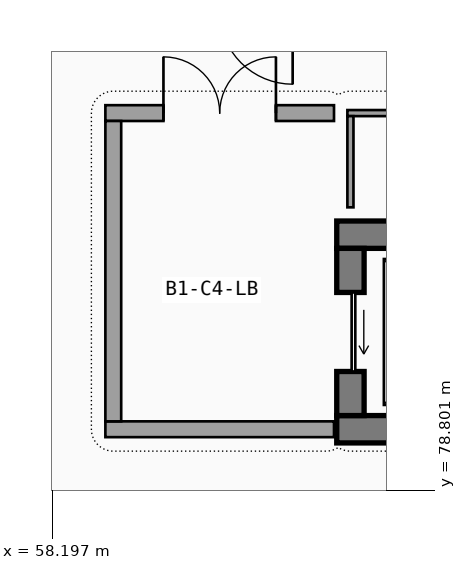
"""IFC4 building model, lengths in metres.
Left out: names, types, materials, properties, quantities, classifications, styles, units other than length and angle.
Written with IfcOpenShell. Run it as: python <this file> out.ifc"""

import sys

from ifc_helpers import new_model, si_unit, direction, frame, frame_2d, origin, place, context, subcontext, project, spatial, rectangle, extrude, element, fill, save


model = new_model("IFC4")
c1 = context("Model", 3, precision=1e-05, world=origin(), true_north=direction((0.0, 1.0)))
c2 = subcontext(c1, "Body", "Model", "MODEL_VIEW")
j1 = project(units=[si_unit("LENGTHUNIT", "METRE"), si_unit("PLANEANGLEUNIT", "RADIAN")], contexts=[c1])
p1 = place(None, origin())
s1 = spatial("IfcSite", under=j1, at=p1, CompositionType="ELEMENT")
p2 = place(p1, origin())
s2 = spatial("IfcBuilding", under=s1, at=p2, CompositionType="ELEMENT")
p3 = place(p2, frame((0.0, 0.0, -4.8)))
s3 = spatial("IfcBuildingStorey", under=s2, at=p3, CompositionType="ELEMENT", Elevation=-4.8)
for number, where, z_axis, x_axis in (
    (1, (62.875, 79.8, 0.0), (0.0, 0.0, 1.0), (1.0, 0.0, 0.0)),
    (2, (66.225, 83.0, 0.0), (0.0, 0.0, 1.0), (-1.0, 0.0, 0.0)),
):
    element("IfcWall", number, at=place(p3, frame(where, z_axis=z_axis, x_axis=x_axis)), inside=s3, PredefinedType="SHEAR", context=c2, shape_type="SweptSolid", body=[
        extrude(rectangle(XDim=3.35, YDim=0.45, at=frame_2d((1.675, 0.0))), origin(), (0.0, 0.0, 1.0), 4.5),
    ])
p4 = place(p3, frame((63.1, 82.775, 0.0), z_axis=(0.0, 0.0, 1.0), x_axis=(0.0, -1.0, 0.0)))
e3 = element("IfcWall", 3, at=p4, inside=s3, PredefinedType="SHEAR", context=c2, shape_type="SweptSolid", body=[
    extrude(rectangle(XDim=2.75, YDim=0.45, at=frame_2d((1.375, 0.0))), origin(), (0.0, 0.0, 1.0), 4.5),
])
p5 = place(p4, frame((0.725, 0.0, 0.0), z_axis=(0.0, 0.0, 1.0), x_axis=(1.0, 0.0, 0.0)))
e4 = element("IfcOpeningElement", 4, at=p5, cuts=e3, PredefinedType="OPENING", context=c2, shape_type="SweptSolid", body=[
    extrude(rectangle(XDim=1.3, YDim=2.25, at=frame_2d((0.65, 1.125))), frame((0.0, 0.235, 0.0), z_axis=(0.0, -1.0, 0.0), x_axis=(1.0, 0.0, 0.0)), (0.0, 0.0, 1.0), 0.47),
])
p6 = place(p3, frame((66.05, 85.0, 0.0), z_axis=(0.0, 0.0, 1.0), x_axis=(-1.0, 0.0, 0.0)))
e5 = element("IfcWall", 5, at=p6, inside=s3, PredefinedType="PARTITIONING", context=c2, shape_type="SweptSolid", body=[
    extrude(rectangle(XDim=3.0, YDim=0.1, at=frame_2d((1.5, 0.0))), origin(), (0.0, 0.0, 1.0), 4.5),
])
p7 = place(p3, frame((63.1, 84.95, 0.0), z_axis=(0.0, 0.0, 1.0), x_axis=(0.0, -1.0, 0.0)))
e6 = element("IfcWall", 6, at=p7, inside=s3, PredefinedType="PARTITIONING", context=c2, shape_type="SweptSolid", body=[
    extrude(rectangle(XDim=1.5, YDim=0.1, at=frame_2d((0.75, 0.0))), origin(), (0.0, 0.0, 1.0), 4.5),
])
p8 = place(p3, frame((59.07, 79.8, 0.0), z_axis=(0.0, 0.0, 1.0), x_axis=(1.0, 0.0, 0.0)))
e7 = element("IfcWall", 7, at=p8, inside=s3, PredefinedType="SOLIDWALL", context=c2, shape_type="SweptSolid", body=[
    extrude(rectangle(XDim=3.76, YDim=0.26, at=frame_2d((1.88, 0.0))), origin(), (0.0, 0.0, 1.0), 4.5),
])
p9 = place(p3, frame((62.83, 85.0, 0.0), z_axis=(0.0, 0.0, 1.0), x_axis=(-1.0, 0.0, 0.0)))
e8 = element("IfcWall", 8, at=p9, inside=s3, PredefinedType="SOLIDWALL", context=c2, shape_type="SweptSolid", body=[
    extrude(rectangle(XDim=3.76, YDim=0.26, at=frame_2d((1.88, 0.0))), origin(), (0.0, 0.0, 1.0), 4.5),
])
p10 = place(p9, frame((2.805, 0.0, 0.0), z_axis=(0.0, 0.0, 1.0), x_axis=(-1.0, 0.0, 0.0)))
e9 = element("IfcOpeningElement", 9, at=p10, cuts=e8, PredefinedType="OPENING", context=c2, shape_type="SweptSolid", body=[
    extrude(rectangle(XDim=1.85, YDim=2.25, at=frame_2d((0.925, 1.125))), frame((0.0, 0.14, 0.0), z_axis=(0.0, -1.0, 0.0), x_axis=(1.0, 0.0, 0.0)), (0.0, 0.0, 1.0), 0.28),
])
p11 = place(p3, frame((59.2, 84.87, 0.0), z_axis=(0.0, 0.0, 1.0), x_axis=(0.0, -1.0, 0.0)))
e10 = element("IfcWall", 10, at=p11, inside=s3, PredefinedType="SOLIDWALL", context=c2, shape_type="SweptSolid", body=[
    extrude(rectangle(XDim=4.94, YDim=0.26, at=frame_2d((2.47, 0.0))), origin(), (0.0, 0.0, 1.0), 4.5),
])
p12 = place(p5, origin())
e11 = element("IfcDoor", 11, at=p12, inside=s3, OperationType="SLIDING_TO_RIGHT", PredefinedType="DOOR", context=c2, shape_type="SweptSolid", body=[
    extrude(rectangle(XDim=1.3, YDim=2.25, at=frame_2d((0.65, 1.125))), frame((0.0, 0.025, 0.0), z_axis=(0.0, -1.0, 0.0), x_axis=(1.0, 0.0, 0.0)), (0.0, 0.0, 1.0), 0.05),
])
fill(e4, e11)
p13 = place(p10, origin())
e12 = element("IfcDoor", 12, at=p13, inside=s3, OperationType="DOUBLE_DOOR_SINGLE_SWING", PredefinedType="DOOR", context=c2, shape_type="SweptSolid", body=[
    extrude(rectangle(XDim=1.85, YDim=2.25, at=frame_2d((0.925, 1.125))), frame((0.0, 0.025, 0.0), z_axis=(0.0, -1.0, 0.0), x_axis=(1.0, 0.0, 0.0)), (0.0, 0.0, 1.0), 0.05),
])
fill(e9, e12)
save(model, sys.argv[1])
